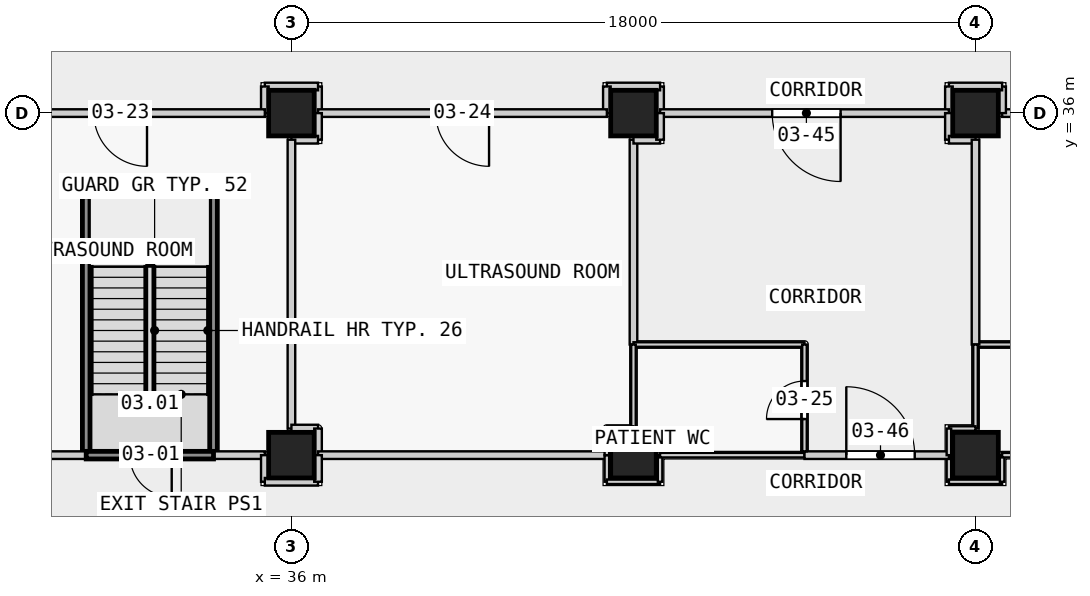
"""IFC4 building model, lengths in metres.
Left out: names, types, materials, properties, quantities, classifications, styles, units other than length and angle.
Written with IfcOpenShell. Run it as: python <this file> out.ifc"""

import sys

from ifc_helpers import new_model, si_unit, direction, frame, frame_2d, origin, origin_2d, place, context, subcontext, project, spatial, rectangle, extrude, element, fill, save


model = new_model("IFC4")
c1 = context("Model", 3, precision=1e-05, world=origin(), true_north=direction((0.0, 1.0)))
c2 = subcontext(c1, "Body", "Model", "MODEL_VIEW")
j1 = project(units=[si_unit("LENGTHUNIT", "METRE"), si_unit("PLANEANGLEUNIT", "RADIAN")], contexts=[c1])
p1 = place(None, origin())
s1 = spatial("IfcSite", under=j1, at=p1, CompositionType="ELEMENT")
p2 = place(p1, origin())
s2 = spatial("IfcBuilding", under=s1, at=p2, CompositionType="ELEMENT")
p3 = place(p2, frame((0.0, 0.0, 17.3)))
s3 = spatial("IfcBuildingStorey", under=s2, at=p3, CompositionType="ELEMENT", Elevation=17.3)
for number, where, z_axis, x_axis in (
    (1, (36.0, 27.0, 0.0), (0.0, 0.0, 1.0), (1.0, 0.0, 0.0)),
    (2, (36.0, 36.0, 0.0), (0.0, 0.0, 1.0), (1.0, 0.0, 0.0)),
    (3, (45.0, 27.0, 0.0), (0.0, 0.0, 1.0), (1.0, 0.0, 0.0)),
    (4, (45.0, 36.0, 0.0), (0.0, 0.0, 1.0), (1.0, 0.0, 0.0)),
    (5, (54.0, 27.0, 0.0), (0.0, 0.0, 1.0), (1.0, 0.0, 0.0)),
    (6, (54.0, 36.0, 0.0), (0.0, 0.0, 1.0), (1.0, 0.0, 0.0)),
):
    element("IfcColumn", number, at=place(p3, frame(where, z_axis=z_axis, x_axis=x_axis)), inside=s3, PredefinedType="COLUMN", context=c2, shape_type="SweptSolid", body=[
        extrude(rectangle(XDim=1.2, YDim=1.2, at=origin_2d()), origin(), (0.0, 0.0, 1.0), 4.5),
    ])
p4 = place(p3, frame((62.3, 36.0, 0.0), z_axis=(0.0, 0.0, 1.0), x_axis=(-1.0, 0.0, 0.0)))
e7 = element("IfcWall", 7, at=p4, inside=s3, PredefinedType="PARTITIONING", context=c2, shape_type="SweptSolid", body=[
    extrude(rectangle(XDim=7.6, YDim=0.2, at=frame_2d((3.8, 0.0))), origin(), (0.0, 0.0, 1.0), 4.15),
])
p5 = place(p3, frame((54.7, 36.0, 0.0), z_axis=(0.0, 0.0, 1.0), x_axis=(0.0, 1.0, 0.0)))
e8 = element("IfcWall", 8, at=p5, inside=s3, PredefinedType="PARTITIONING", context=c2, shape_type="SweptSolid", body=[
    extrude(rectangle(XDim=0.7, YDim=0.2, at=frame_2d((0.35, 0.0))), origin(), (0.0, 0.0, 1.0), 4.15),
])
p6 = place(p3, frame((54.7, 36.7, 0.0), z_axis=(0.0, 0.0, 1.0), x_axis=(-1.0, 0.0, 0.0)))
e9 = element("IfcWall", 9, at=p6, inside=s3, PredefinedType="PARTITIONING", context=c2, shape_type="SweptSolid", body=[
    extrude(rectangle(XDim=1.4, YDim=0.2, at=frame_2d((0.7, 0.0))), origin(), (0.0, 0.0, 1.0), 4.15),
])
p7 = place(p3, frame((53.3, 36.7, 0.0), z_axis=(0.0, 0.0, 1.0), x_axis=(0.0, -1.0, 0.0)))
e10 = element("IfcWall", 10, at=p7, inside=s3, PredefinedType="PARTITIONING", context=c2, shape_type="SweptSolid", body=[
    extrude(rectangle(XDim=0.7, YDim=0.2, at=frame_2d((0.35, 0.0))), origin(), (0.0, 0.0, 1.0), 4.15),
])
p8 = place(p3, frame((30.6, 27.0, 0.0), z_axis=(0.0, 0.0, 1.0), x_axis=(0.0, 1.0, 0.0)))
e11 = element("IfcWall", 11, at=p8, inside=s3, PredefinedType="PARTITIONING", context=c2, shape_type="SweptSolid", body=[
    extrude(rectangle(XDim=6.9, YDim=0.2, at=frame_2d((3.45, 0.0))), origin(), (0.0, 0.0, 1.0), 4.15),
])
p9 = place(p3, frame((30.6, 33.9, 0.0), z_axis=(0.0, 0.0, 1.0), x_axis=(1.0, 0.0, 0.0)))
e12 = element("IfcWall", 12, at=p9, inside=s3, PredefinedType="PARTITIONING", context=c2, shape_type="SweptSolid", body=[
    extrude(rectangle(XDim=3.35, YDim=0.2, at=frame_2d((1.675, 0.0))), origin(), (0.0, 0.0, 1.0), 4.15),
])
p10 = place(p3, frame((33.95, 33.9, 0.0), z_axis=(0.0, 0.0, 1.0), x_axis=(0.0, -1.0, 0.0)))
e13 = element("IfcWall", 13, at=p10, inside=s3, PredefinedType="PARTITIONING", context=c2, shape_type="SweptSolid", body=[
    extrude(rectangle(XDim=6.9, YDim=0.2, at=frame_2d((3.45, 0.0))), origin(), (0.0, 0.0, 1.0), 4.15),
])
p11 = place(p3, frame((53.3, 27.0, 0.0), z_axis=(0.0, 0.0, 1.0), x_axis=(0.0, -1.0, 0.0)))
e14 = element("IfcWall", 14, at=p11, inside=s3, PredefinedType="PARTITIONING", context=c2, shape_type="SweptSolid", body=[
    extrude(rectangle(XDim=0.7, YDim=0.12, at=frame_2d((0.35, 0.0))), origin(), (0.0, 0.0, 1.0), 4.15),
])
p12 = place(p3, frame((53.3, 26.3, 0.0), z_axis=(0.0, 0.0, 1.0), x_axis=(1.0, 0.0, 0.0)))
e15 = element("IfcWall", 15, at=p12, inside=s3, PredefinedType="PARTITIONING", context=c2, shape_type="SweptSolid", body=[
    extrude(rectangle(XDim=1.4, YDim=0.12, at=frame_2d((0.7, 0.0))), origin(), (0.0, 0.0, 1.0), 4.15),
])
p13 = place(p3, frame((54.7, 26.3, 0.0), z_axis=(0.0, 0.0, 1.0), x_axis=(0.0, 1.0, 0.0)))
e16 = element("IfcWall", 16, at=p13, inside=s3, PredefinedType="PARTITIONING", context=c2, shape_type="SweptSolid", body=[
    extrude(rectangle(XDim=0.7, YDim=0.12, at=frame_2d((0.35, 0.0))), origin(), (0.0, 0.0, 1.0), 4.15),
])
p14 = place(p3, frame((54.7, 27.0, 0.0), z_axis=(0.0, 0.0, 1.0), x_axis=(1.0, 0.0, 0.0)))
e17 = element("IfcWall", 17, at=p14, inside=s3, PredefinedType="PARTITIONING", context=c2, shape_type="SweptSolid", body=[
    extrude(rectangle(XDim=7.6, YDim=0.12, at=frame_2d((3.8, 0.0))), origin(), (0.0, 0.0, 1.0), 4.15),
])
p15 = place(p14, frame((3.35, 0.0, 0.0)))
e18 = element("IfcOpeningElement", 18, at=p15, cuts=e17, PredefinedType="OPENING", context=c2, shape_type="SweptSolid", body=[
    extrude(rectangle(XDim=1.0, YDim=2.1, at=frame_2d((0.5, 1.05))), frame((0.0, 0.07, 0.0), z_axis=(0.0, -1.0, 0.0), x_axis=(1.0, 0.0, 0.0)), (0.0, 0.0, 1.0), 0.14),
])
p16 = place(p3, frame((36.7, 36.0, 0.0), z_axis=(0.0, 0.0, 1.0), x_axis=(0.0, 1.0, 0.0)))
e19 = element("IfcWall", 19, at=p16, inside=s3, PredefinedType="PARTITIONING", context=c2, shape_type="SweptSolid", body=[
    extrude(rectangle(XDim=0.7, YDim=0.2, at=frame_2d((0.35, 0.0))), origin(), (0.0, 0.0, 1.0), 4.15),
])
p17 = place(p3, frame((36.7, 36.7, 0.0), z_axis=(0.0, 0.0, 1.0), x_axis=(-1.0, 0.0, 0.0)))
e20 = element("IfcWall", 20, at=p17, inside=s3, PredefinedType="PARTITIONING", context=c2, shape_type="SweptSolid", body=[
    extrude(rectangle(XDim=1.4, YDim=0.2, at=frame_2d((0.7, 0.0))), origin(), (0.0, 0.0, 1.0), 4.15),
])
p18 = place(p3, frame((35.3, 36.7, 0.0), z_axis=(0.0, 0.0, 1.0), x_axis=(0.0, -1.0, 0.0)))
e21 = element("IfcWall", 21, at=p18, inside=s3, PredefinedType="PARTITIONING", context=c2, shape_type="SweptSolid", body=[
    extrude(rectangle(XDim=0.7, YDim=0.2, at=frame_2d((0.35, 0.0))), origin(), (0.0, 0.0, 1.0), 4.15),
])
p19 = place(p3, frame((35.3, 36.0, 0.0), z_axis=(0.0, 0.0, 1.0), x_axis=(-1.0, 0.0, 0.0)))
e22 = element("IfcWall", 22, at=p19, inside=s3, PredefinedType="PARTITIONING", context=c2, shape_type="SweptSolid", body=[
    extrude(rectangle(XDim=7.6, YDim=0.2, at=frame_2d((3.8, 0.0))), origin(), (0.0, 0.0, 1.0), 4.15),
])
p20 = place(p19, frame((3.1, 0.0, 0.0)))
e23 = element("IfcOpeningElement", 23, at=p20, cuts=e22, PredefinedType="OPENING", context=c2, shape_type="SweptSolid", body=[
    extrude(rectangle(XDim=1.4, YDim=2.1, at=frame_2d((0.7, 1.05))), frame((0.0, 0.11, 0.0), z_axis=(0.0, -1.0, 0.0), x_axis=(1.0, 0.0, 0.0)), (0.0, 0.0, 1.0), 0.22),
])
p21 = place(p3, frame((54.0, 29.911, 0.0), z_axis=(0.0, 0.0, 1.0), x_axis=(1.0, 0.0, 0.0)))
e24 = element("IfcWall", 24, at=p21, inside=s3, PredefinedType="PARTITIONING", context=c2, shape_type="SweptSolid", body=[
    extrude(rectangle(XDim=9.0, YDim=0.12, at=frame_2d((4.5, 0.0))), origin(), (0.0, 0.0, 1.0), 4.15),
])
p22 = place(p3, frame((45.7, 36.0, 0.0), z_axis=(0.0, 0.0, 1.0), x_axis=(0.0, 1.0, 0.0)))
e25 = element("IfcWall", 25, at=p22, inside=s3, PredefinedType="PARTITIONING", context=c2, shape_type="SweptSolid", body=[
    extrude(rectangle(XDim=0.7, YDim=0.2, at=frame_2d((0.35, 0.0))), origin(), (0.0, 0.0, 1.0), 4.15),
])
p23 = place(p3, frame((45.7, 36.7, 0.0), z_axis=(0.0, 0.0, 1.0), x_axis=(-1.0, 0.0, 0.0)))
e26 = element("IfcWall", 26, at=p23, inside=s3, PredefinedType="PARTITIONING", context=c2, shape_type="SweptSolid", body=[
    extrude(rectangle(XDim=1.4, YDim=0.2, at=frame_2d((0.7, 0.0))), origin(), (0.0, 0.0, 1.0), 4.15),
])
p24 = place(p3, frame((44.3, 36.7, 0.0), z_axis=(0.0, 0.0, 1.0), x_axis=(0.0, -1.0, 0.0)))
e27 = element("IfcWall", 27, at=p24, inside=s3, PredefinedType="PARTITIONING", context=c2, shape_type="SweptSolid", body=[
    extrude(rectangle(XDim=0.7, YDim=0.2, at=frame_2d((0.35, 0.0))), origin(), (0.0, 0.0, 1.0), 4.15),
])
p25 = place(p3, frame((44.3, 36.0, 0.0), z_axis=(0.0, 0.0, 1.0), x_axis=(-1.0, 0.0, 0.0)))
e28 = element("IfcWall", 28, at=p25, inside=s3, PredefinedType="PARTITIONING", context=c2, shape_type="SweptSolid", body=[
    extrude(rectangle(XDim=7.6, YDim=0.2, at=frame_2d((3.8, 0.0))), origin(), (0.0, 0.0, 1.0), 4.15),
])
p26 = place(p25, frame((3.1, 0.0, 0.0)))
e29 = element("IfcOpeningElement", 29, at=p26, cuts=e28, PredefinedType="OPENING", context=c2, shape_type="SweptSolid", body=[
    extrude(rectangle(XDim=1.4, YDim=2.1, at=frame_2d((0.7, 1.05))), frame((0.0, 0.11, 0.0), z_axis=(0.0, -1.0, 0.0), x_axis=(1.0, 0.0, 0.0)), (0.0, 0.0, 1.0), 0.22),
])
for number, where, z_axis, x_axis in (
    (30, (36.7, 36.0, 0.0), (0.0, 0.0, 1.0), (0.0, -1.0, 0.0)),
    (31, (36.7, 35.3, 0.0), (0.0, 0.0, 1.0), (-1.0, 0.0, 0.0)),
):
    element("IfcWall", number, at=place(p3, frame(where, z_axis=z_axis, x_axis=x_axis)), inside=s3, PredefinedType="PARTITIONING", context=c2, shape_type="SweptSolid", body=[
        extrude(rectangle(XDim=0.7, YDim=0.2, at=frame_2d((0.35, 0.0))), origin(), (0.0, 0.0, 1.0), 4.15),
    ])
p27 = place(p3, frame((36.0, 35.3, 0.0), z_axis=(0.0, 0.0, 1.0), x_axis=(0.0, -1.0, 0.0)))
e32 = element("IfcWall", 32, at=p27, inside=s3, PredefinedType="PARTITIONING", context=c2, shape_type="SweptSolid", body=[
    extrude(rectangle(XDim=7.6, YDim=0.2, at=frame_2d((3.8, 0.0))), origin(), (0.0, 0.0, 1.0), 4.15),
])
for number, where, z_axis, x_axis in (
    (33, (36.0, 27.7, 0.0), (0.0, 0.0, 1.0), (1.0, 0.0, 0.0)),
    (34, (36.7, 27.7, 0.0), (0.0, 0.0, 1.0), (0.0, -1.0, 0.0)),
):
    element("IfcWall", number, at=place(p3, frame(where, z_axis=z_axis, x_axis=x_axis)), inside=s3, PredefinedType="PARTITIONING", context=c2, shape_type="SweptSolid", body=[
        extrude(rectangle(XDim=0.7, YDim=0.2, at=frame_2d((0.35, 0.0))), origin(), (0.0, 0.0, 1.0), 4.15),
    ])
p28 = place(p3, frame((53.3, 36.0, 0.0), z_axis=(0.0, 0.0, 1.0), x_axis=(-1.0, 0.0, 0.0)))
e35 = element("IfcWall", 35, at=p28, inside=s3, PredefinedType="PARTITIONING", context=c2, shape_type="SweptSolid", body=[
    extrude(rectangle(XDim=7.6, YDim=0.2, at=frame_2d((3.8, 0.0))), origin(), (0.0, 0.0, 1.0), 4.15),
])
p29 = place(p28, frame((2.85, 0.0, 0.0)))
e36 = element("IfcOpeningElement", 36, at=p29, cuts=e35, PredefinedType="OPENING", context=c2, shape_type="SweptSolid", body=[
    extrude(rectangle(XDim=1.8, YDim=2.1, at=frame_2d((0.9, 1.05))), frame((0.0, 0.11, 0.0), z_axis=(0.0, -1.0, 0.0), x_axis=(1.0, 0.0, 0.0)), (0.0, 0.0, 1.0), 0.22),
])
p30 = place(p3, frame((36.7, 27.0, 0.0), z_axis=(0.0, 0.0, 1.0), x_axis=(1.0, 0.0, 0.0)))
e37 = element("IfcWall", 37, at=p30, inside=s3, PredefinedType="PARTITIONING", context=c2, shape_type="SweptSolid", body=[
    extrude(rectangle(XDim=7.6, YDim=0.2, at=frame_2d((3.8, 0.0))), origin(), (0.0, 0.0, 1.0), 4.15),
])
p31 = place(p3, frame((45.0, 29.911, 0.0), z_axis=(0.0, 0.0, 1.0), x_axis=(0.0, 1.0, 0.0)))
e38 = element("IfcWall", 38, at=p31, inside=s3, PredefinedType="PARTITIONING", context=c2, shape_type="SweptSolid", body=[
    extrude(rectangle(XDim=5.389, YDim=0.2, at=frame_2d((2.695, 0.0))), origin(), (0.0, 0.0, 1.0), 4.15),
])
for number, where, z_axis, x_axis in (
    (39, (45.0, 35.3, 0.0), (0.0, 0.0, 1.0), (1.0, 0.0, 0.0)),
    (40, (45.7, 35.3, 0.0), (0.0, 0.0, 1.0), (0.0, 1.0, 0.0)),
    (41, (53.3, 36.0, 0.0), (0.0, 0.0, 1.0), (0.0, -1.0, 0.0)),
    (42, (53.3, 35.3, 0.0), (0.0, 0.0, 1.0), (1.0, 0.0, 0.0)),
):
    element("IfcWall", number, at=place(p3, frame(where, z_axis=z_axis, x_axis=x_axis)), inside=s3, PredefinedType="PARTITIONING", context=c2, shape_type="SweptSolid", body=[
        extrude(rectangle(XDim=0.7, YDim=0.2, at=frame_2d((0.35, 0.0))), origin(), (0.0, 0.0, 1.0), 4.15),
    ])
p32 = place(p3, frame((54.0, 35.3, 0.0), z_axis=(0.0, 0.0, 1.0), x_axis=(0.0, -1.0, 0.0)))
e43 = element("IfcWall", 43, at=p32, inside=s3, PredefinedType="PARTITIONING", context=c2, shape_type="SweptSolid", body=[
    extrude(rectangle(XDim=5.389, YDim=0.2, at=frame_2d((2.695, 0.0))), origin(), (0.0, 0.0, 1.0), 4.15),
])
p33 = place(p3, frame((44.3, 27.0, 0.0), z_axis=(0.0, 0.0, 1.0), x_axis=(0.0, -1.0, 0.0)))
e44 = element("IfcWall", 44, at=p33, inside=s3, PredefinedType="PARTITIONING", context=c2, shape_type="SweptSolid", body=[
    extrude(rectangle(XDim=0.7, YDim=0.12, at=frame_2d((0.35, 0.0))), origin(), (0.0, 0.0, 1.0), 4.15),
])
p34 = place(p3, frame((44.3, 26.3, 0.0), z_axis=(0.0, 0.0, 1.0), x_axis=(1.0, 0.0, 0.0)))
e45 = element("IfcWall", 45, at=p34, inside=s3, PredefinedType="PARTITIONING", context=c2, shape_type="SweptSolid", body=[
    extrude(rectangle(XDim=1.4, YDim=0.12, at=frame_2d((0.7, 0.0))), origin(), (0.0, 0.0, 1.0), 4.15),
])
p35 = place(p3, frame((45.7, 26.3, 0.0), z_axis=(0.0, 0.0, 1.0), x_axis=(0.0, 1.0, 0.0)))
e46 = element("IfcWall", 46, at=p35, inside=s3, PredefinedType="PARTITIONING", context=c2, shape_type="SweptSolid", body=[
    extrude(rectangle(XDim=0.7, YDim=0.12, at=frame_2d((0.35, 0.0))), origin(), (0.0, 0.0, 1.0), 4.15),
])
p36 = place(p3, frame((45.7, 27.0, 0.0), z_axis=(0.0, 0.0, 1.0), x_axis=(1.0, 0.0, 0.0)))
e47 = element("IfcWall", 47, at=p36, inside=s3, PredefinedType="PARTITIONING", context=c2, shape_type="SweptSolid", body=[
    extrude(rectangle(XDim=3.8, YDim=0.12, at=frame_2d((1.9, 0.0))), origin(), (0.0, 0.0, 1.0), 4.15),
])
p37 = place(p3, frame((27.7, 27.0, 0.0), z_axis=(0.0, 0.0, 1.0), x_axis=(1.0, 0.0, 0.0)))
e48 = element("IfcWall", 48, at=p37, inside=s3, PredefinedType="PARTITIONING", context=c2, shape_type="SweptSolid", body=[
    extrude(rectangle(XDim=2.9, YDim=0.2, at=frame_2d((1.45, 0.0))), origin(), (0.0, 0.0, 1.0), 4.15),
])
p38 = place(p3, frame((49.5, 29.911, 0.0), z_axis=(0.0, 0.0, 1.0), x_axis=(-1.0, 0.0, 0.0)))
e49 = element("IfcWall", 49, at=p38, inside=s3, PredefinedType="PARTITIONING", context=c2, shape_type="SweptSolid", body=[
    extrude(rectangle(XDim=4.5, YDim=0.12, at=frame_2d((2.25, 0.0))), origin(), (0.0, 0.0, 1.0), 4.15),
])
p39 = place(p3, frame((33.95, 27.0, 0.0), z_axis=(0.0, 0.0, 1.0), x_axis=(1.0, 0.0, 0.0)))
e50 = element("IfcWall", 50, at=p39, inside=s3, PredefinedType="PARTITIONING", context=c2, shape_type="SweptSolid", body=[
    extrude(rectangle(XDim=1.35, YDim=0.2, at=frame_2d((0.675, 0.0))), origin(), (0.0, 0.0, 1.0), 4.15),
])
p40 = place(p3, frame((35.3, 27.0, 0.0), z_axis=(0.0, 0.0, 1.0), x_axis=(0.0, -1.0, 0.0)))
e51 = element("IfcWall", 51, at=p40, inside=s3, PredefinedType="PARTITIONING", context=c2, shape_type="SweptSolid", body=[
    extrude(rectangle(XDim=0.7, YDim=0.2, at=frame_2d((0.35, 0.0))), origin(), (0.0, 0.0, 1.0), 4.15),
])
p41 = place(p3, frame((35.3, 26.3, 0.0), z_axis=(0.0, 0.0, 1.0), x_axis=(1.0, 0.0, 0.0)))
e52 = element("IfcWall", 52, at=p41, inside=s3, PredefinedType="PARTITIONING", context=c2, shape_type="SweptSolid", body=[
    extrude(rectangle(XDim=1.4, YDim=0.2, at=frame_2d((0.7, 0.0))), origin(), (0.0, 0.0, 1.0), 4.15),
])
p42 = place(p3, frame((36.7, 26.3, 0.0), z_axis=(0.0, 0.0, 1.0), x_axis=(0.0, 1.0, 0.0)))
e53 = element("IfcWall", 53, at=p42, inside=s3, PredefinedType="PARTITIONING", context=c2, shape_type="SweptSolid", body=[
    extrude(rectangle(XDim=0.7, YDim=0.2, at=frame_2d((0.35, 0.0))), origin(), (0.0, 0.0, 1.0), 4.15),
])
p43 = place(p3, frame((49.5, 27.0, 0.0), z_axis=(0.0, 0.0, 1.0), x_axis=(1.0, 0.0, 0.0)))
e54 = element("IfcWall", 54, at=p43, inside=s3, PredefinedType="PARTITIONING", context=c2, shape_type="SweptSolid", body=[
    extrude(rectangle(XDim=3.8, YDim=0.2, at=frame_2d((1.9, 0.0))), origin(), (0.0, 0.0, 1.0), 4.15),
])
p44 = place(p43, frame((1.1, 0.0, 0.0)))
e55 = element("IfcOpeningElement", 55, at=p44, cuts=e54, PredefinedType="OPENING", context=c2, shape_type="SweptSolid", body=[
    extrude(rectangle(XDim=1.8, YDim=2.1, at=frame_2d((0.9, 1.05))), frame((0.0, 0.11, 0.0), z_axis=(0.0, -1.0, 0.0), x_axis=(1.0, 0.0, 0.0)), (0.0, 0.0, 1.0), 0.22),
])
p45 = place(p3, frame((54.0, 29.911, 0.0), z_axis=(0.0, 0.0, 1.0), x_axis=(0.0, -1.0, 0.0)))
e56 = element("IfcWall", 56, at=p45, inside=s3, PredefinedType="PARTITIONING", context=c2, shape_type="SweptSolid", body=[
    extrude(rectangle(XDim=2.211, YDim=0.12, at=frame_2d((1.105, 0.0))), origin(), (0.0, 0.0, 1.0), 4.15),
])
for number, where, z_axis, x_axis in (
    (57, (54.0, 27.7, 0.0), (0.0, 0.0, 1.0), (-1.0, 0.0, 0.0)),
    (58, (53.3, 27.7, 0.0), (0.0, 0.0, 1.0), (0.0, -1.0, 0.0)),
):
    element("IfcWall", number, at=place(p3, frame(where, z_axis=z_axis, x_axis=x_axis)), inside=s3, PredefinedType="PARTITIONING", context=c2, shape_type="SweptSolid", body=[
        extrude(rectangle(XDim=0.7, YDim=0.12, at=frame_2d((0.35, 0.0))), origin(), (0.0, 0.0, 1.0), 4.15),
    ])
p46 = place(p3, frame((45.0, 29.911, 0.0), z_axis=(0.0, 0.0, 1.0), x_axis=(0.0, -1.0, 0.0)))
e59 = element("IfcWall", 59, at=p46, inside=s3, PredefinedType="PARTITIONING", context=c2, shape_type="SweptSolid", body=[
    extrude(rectangle(XDim=2.211, YDim=0.12, at=frame_2d((1.105, 0.0))), origin(), (0.0, 0.0, 1.0), 4.15),
])
for number, where, z_axis, x_axis in (
    (60, (45.0, 27.7, 0.0), (0.0, 0.0, 1.0), (-1.0, 0.0, 0.0)),
    (61, (44.3, 27.7, 0.0), (0.0, 0.0, 1.0), (0.0, -1.0, 0.0)),
):
    element("IfcWall", number, at=place(p3, frame(where, z_axis=z_axis, x_axis=x_axis)), inside=s3, PredefinedType="PARTITIONING", context=c2, shape_type="SweptSolid", body=[
        extrude(rectangle(XDim=0.7, YDim=0.12, at=frame_2d((0.35, 0.0))), origin(), (0.0, 0.0, 1.0), 4.15),
    ])
p47 = place(p3, frame((33.95, 27.0, 0.0), z_axis=(0.0, 0.0, 1.0), x_axis=(-1.0, 0.0, 0.0)))
e62 = element("IfcWall", 62, at=p47, inside=s3, PredefinedType="PARTITIONING", context=c2, shape_type="SweptSolid", body=[
    extrude(rectangle(XDim=3.35, YDim=0.2, at=frame_2d((1.675, 0.0))), origin(), (0.0, 0.0, 1.0), 4.15),
])
p48 = place(p47, frame((1.1, 0.0, 0.0)))
e63 = element("IfcOpeningElement", 63, at=p48, cuts=e62, PredefinedType="OPENING", context=c2, shape_type="SweptSolid", body=[
    extrude(rectangle(XDim=1.1, YDim=2.1, at=frame_2d((0.55, 1.05))), frame((0.0, 0.11, 0.0), z_axis=(0.0, -1.0, 0.0), x_axis=(1.0, 0.0, 0.0)), (0.0, 0.0, 1.0), 0.22),
])
p49 = place(p3, frame((49.5, 27.1, 0.0), z_axis=(0.0, 0.0, 1.0), x_axis=(0.0, 1.0, 0.0)))
e64 = element("IfcWall", 64, at=p49, inside=s3, PredefinedType="PARTITIONING", context=c2, shape_type="SweptSolid", body=[
    extrude(rectangle(XDim=2.811, YDim=0.12, at=frame_2d((1.405, 0.0))), origin(), (0.0, 0.0, 1.0), 4.15),
])
p50 = place(p49, frame((0.85, 0.0, 0.0)))
e65 = element("IfcOpeningElement", 65, at=p50, cuts=e64, PredefinedType="OPENING", context=c2, shape_type="SweptSolid", body=[
    extrude(rectangle(XDim=1.0, YDim=2.1, at=frame_2d((0.5, 1.05))), frame((0.0, 0.07, 0.0), z_axis=(0.0, -1.0, 0.0), x_axis=(1.0, 0.0, 0.0)), (0.0, 0.0, 1.0), 0.14),
])
p51 = place(p48, origin())
e66 = element("IfcDoor", 66, at=p51, inside=s3, OperationType="SINGLE_SWING_LEFT", PredefinedType="DOOR", context=c2, shape_type="SweptSolid", body=[
    extrude(rectangle(XDim=1.1, YDim=2.1, at=frame_2d((0.55, 1.05))), frame((0.0, 0.025, 0.0), z_axis=(0.0, -1.0, 0.0), x_axis=(1.0, 0.0, 0.0)), (0.0, 0.0, 1.0), 0.05),
])
fill(e63, e66)
p52 = place(p20, origin())
e67 = element("IfcDoor", 67, at=p52, inside=s3, OperationType="SINGLE_SWING_LEFT", PredefinedType="DOOR", context=c2, shape_type="SweptSolid", body=[
    extrude(rectangle(XDim=1.4, YDim=2.1, at=frame_2d((0.7, 1.05))), frame((0.0, 0.025, 0.0), z_axis=(0.0, -1.0, 0.0), x_axis=(1.0, 0.0, 0.0)), (0.0, 0.0, 1.0), 0.05),
])
fill(e23, e67)
p53 = place(p26, origin())
e68 = element("IfcDoor", 68, at=p53, inside=s3, OperationType="SINGLE_SWING_LEFT", PredefinedType="DOOR", context=c2, shape_type="SweptSolid", body=[
    extrude(rectangle(XDim=1.4, YDim=2.1, at=frame_2d((0.7, 1.05))), frame((0.0, 0.025, 0.0), z_axis=(0.0, -1.0, 0.0), x_axis=(1.0, 0.0, 0.0)), (0.0, 0.0, 1.0), 0.05),
])
fill(e29, e68)
p54 = place(p50, origin())
e69 = element("IfcDoor", 69, at=p54, inside=s3, OperationType="SINGLE_SWING_LEFT", PredefinedType="DOOR", context=c2, shape_type="SweptSolid", body=[
    extrude(rectangle(XDim=1.0, YDim=2.1, at=frame_2d((0.5, 1.05))), frame((0.0, 0.025, 0.0), z_axis=(0.0, -1.0, 0.0), x_axis=(1.0, 0.0, 0.0)), (0.0, 0.0, 1.0), 0.05),
])
fill(e65, e69)
p55 = place(p29, origin())
e70 = element("IfcDoor", 70, at=p55, inside=s3, OperationType="DOUBLE_DOOR_SINGLE_SWING", PredefinedType="DOOR", context=c2, shape_type="SweptSolid", body=[
    extrude(rectangle(XDim=1.8, YDim=2.1, at=frame_2d((0.9, 1.05))), frame((0.0, 0.025, 0.0), z_axis=(0.0, -1.0, 0.0), x_axis=(1.0, 0.0, 0.0)), (0.0, 0.0, 1.0), 0.05),
])
fill(e36, e70)
p56 = place(p44, origin())
e71 = element("IfcDoor", 71, at=p56, inside=s3, OperationType="DOUBLE_DOOR_SINGLE_SWING", PredefinedType="DOOR", context=c2, shape_type="SweptSolid", body=[
    extrude(rectangle(XDim=1.8, YDim=2.1, at=frame_2d((0.9, 1.05))), frame((0.0, 0.025, 0.0), z_axis=(0.0, -1.0, 0.0), x_axis=(1.0, 0.0, 0.0)), (0.0, 0.0, 1.0), 0.05),
])
fill(e55, e71)
save(model, sys.argv[1])
